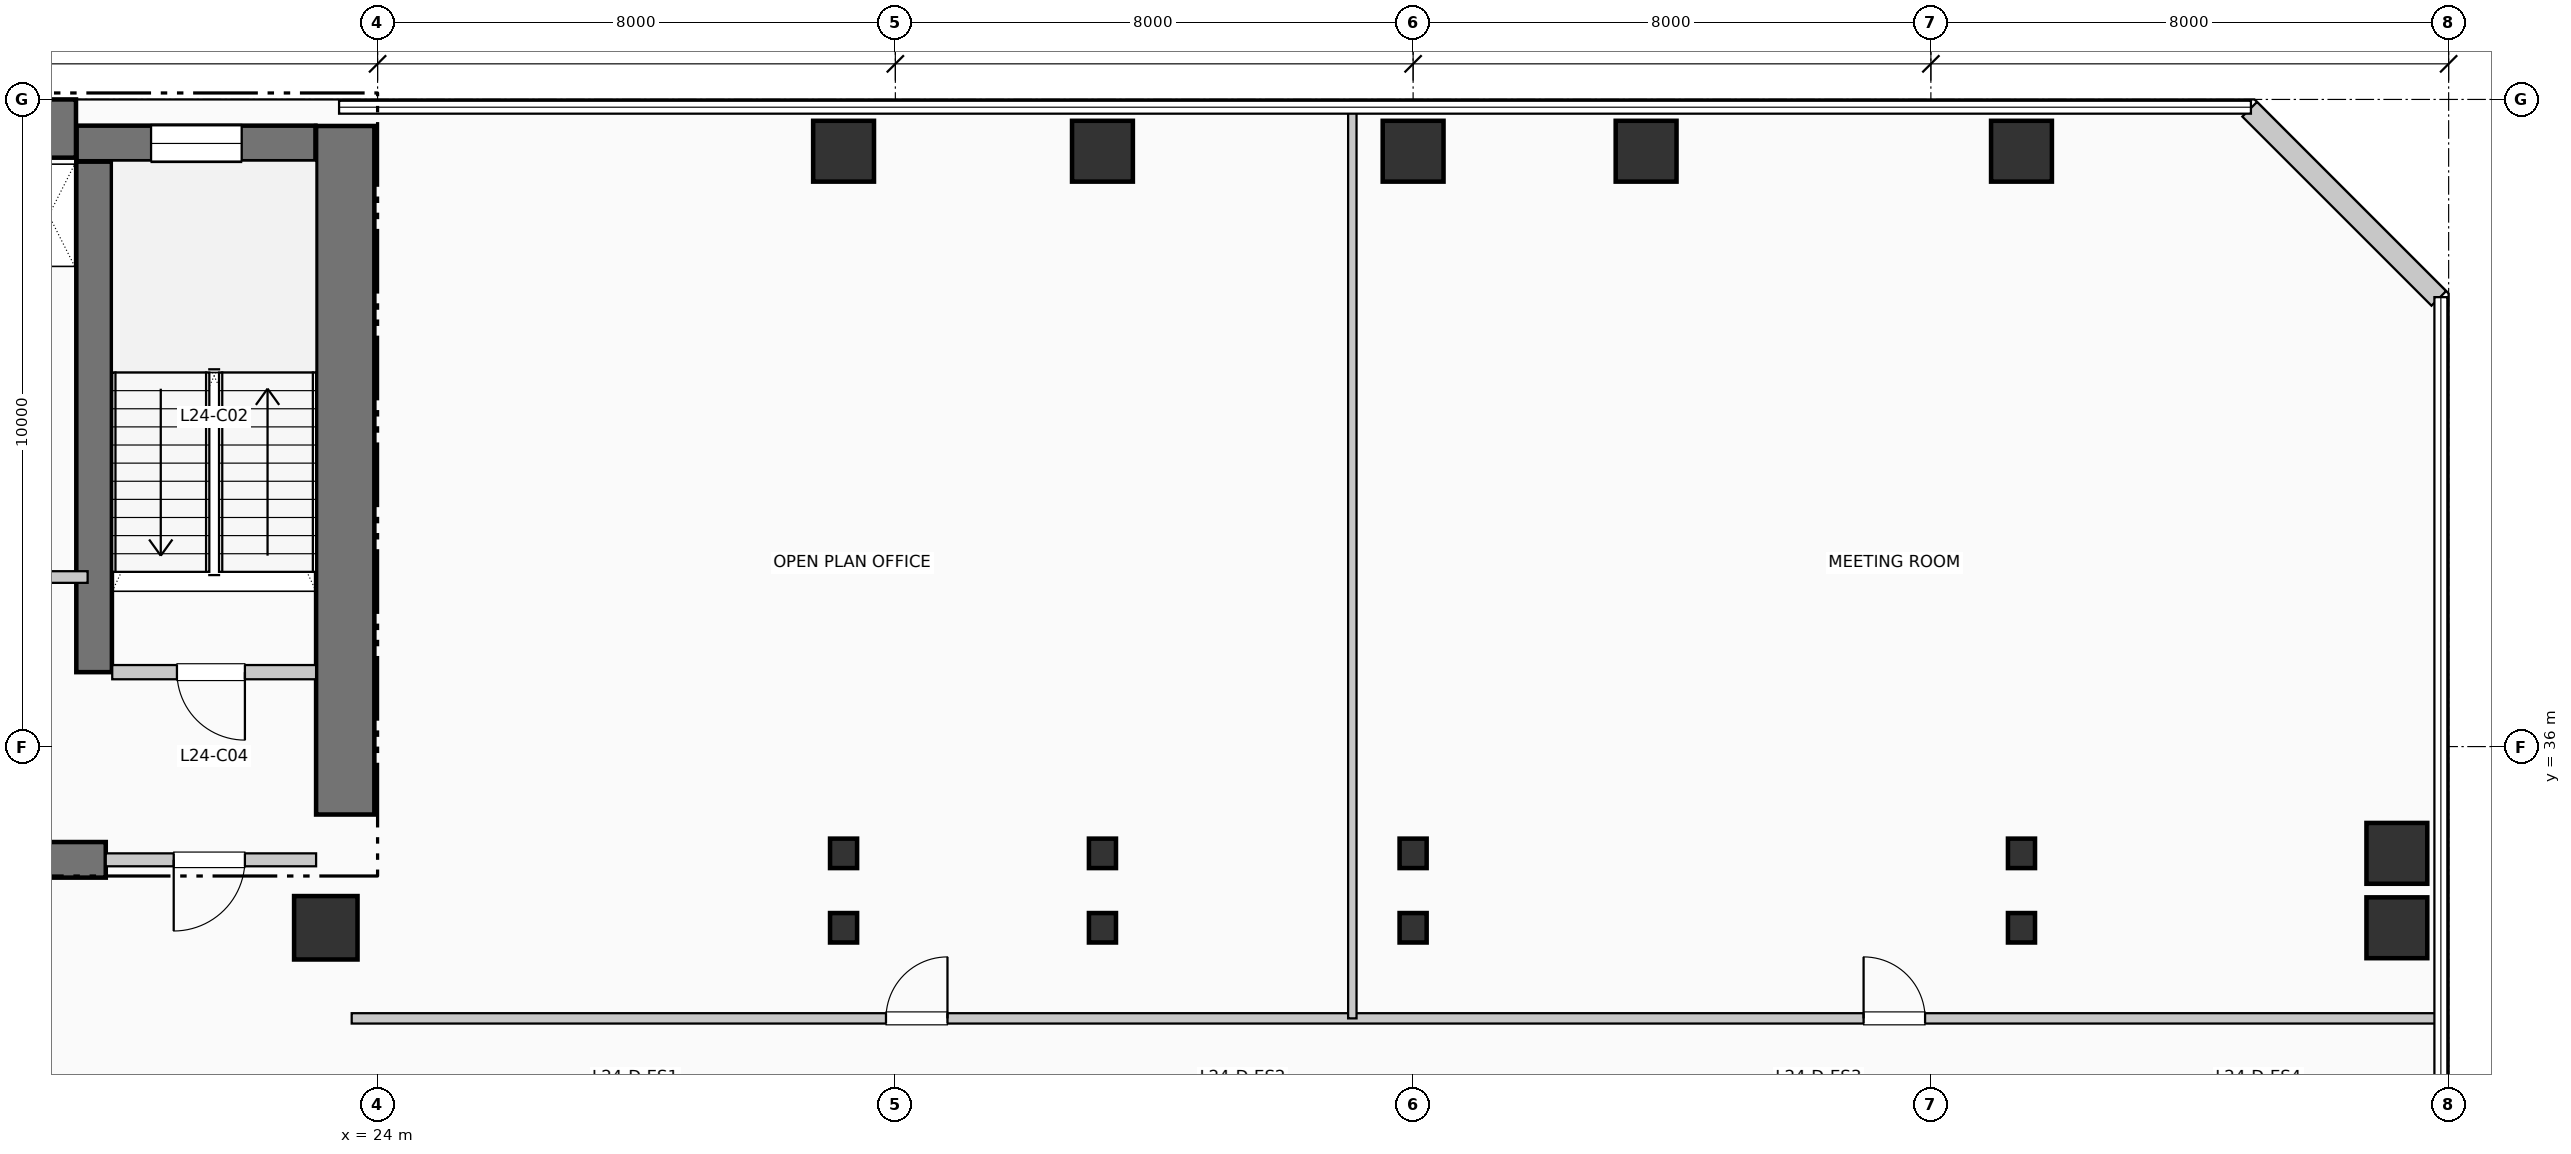
"""IFC4 building model, lengths in metres.
Left out: names, types, materials, properties, quantities, classifications, styles, units other than length and angle.
Written with IfcOpenShell. Run it as: python <this file> out.ifc"""

import sys

from ifc_helpers import new_model, si_unit, direction, frame, frame_2d, origin, origin_2d, place, context, subcontext, project, spatial, rectangle, i_section, extrude, element, fill, save


model = new_model("IFC4")
c1 = context("Model", 3, precision=1e-05, world=origin(), true_north=direction((0.0, 1.0)))
c2 = subcontext(c1, "Body", "Model", "MODEL_VIEW")
j1 = project(units=[si_unit("LENGTHUNIT", "METRE"), si_unit("PLANEANGLEUNIT", "RADIAN")], contexts=[c1])
p1 = place(None, origin())
s1 = spatial("IfcSite", under=j1, at=p1, CompositionType="ELEMENT")
p2 = place(p1, origin())
s2 = spatial("IfcBuilding", under=s1, at=p2, CompositionType="ELEMENT")
p3 = place(p2, frame((0.0, 0.0, 102.63)))
s3 = spatial("IfcBuildingStorey", under=s2, at=p3, CompositionType="ELEMENT", Elevation=102.63)
p4 = place(p3, frame((5.36, 45.55, 0.0), z_axis=(0.0, 0.0, 1.0), x_axis=(1.0, 0.0, 0.0)))
e1 = element("IfcWall", 1, at=p4, inside=s3, PredefinedType="SHEAR", context=c2, shape_type="SweptSolid", body=[
    extrude(rectangle(XDim=13.98, YDim=0.9, at=frame_2d((6.99, 0.0))), origin(), (0.0, 0.0, 1.0), 3.96),
])
p5 = place(p3, frame((23.5, 34.95, 0.0), z_axis=(0.0, 0.0, 1.0), x_axis=(0.0, 1.0, 0.0)))
e2 = element("IfcWall", 2, at=p5, inside=s3, PredefinedType="SHEAR", context=c2, shape_type="SweptSolid", body=[
    extrude(rectangle(XDim=10.64, YDim=0.9, at=frame_2d((5.32, 0.0))), origin(), (0.0, 0.0, 1.0), 3.96),
])
p6 = place(p3, frame((13.68, 34.25, 0.0), z_axis=(0.0, 0.0, 1.0), x_axis=(1.0, 0.0, 0.0)))
e3 = element("IfcWall", 3, at=p6, inside=s3, PredefinedType="SHEAR", context=c2, shape_type="SweptSolid", body=[
    extrude(rectangle(XDim=6.12, YDim=0.55, at=frame_2d((3.06, 0.0))), origin(), (0.0, 0.0, 1.0), 3.96),
])
p7 = place(p3, frame((19.62, 37.15, 0.0), z_axis=(0.0, 0.0, 1.0), x_axis=(0.0, 1.0, 0.0)))
e4 = element("IfcWall", 4, at=p7, inside=s3, PredefinedType="SHEAR", context=c2, shape_type="SweptSolid", body=[
    extrude(rectangle(XDim=7.89, YDim=0.55, at=frame_2d((3.945, 0.0))), origin(), (0.0, 0.0, 1.0), 3.96),
])
p8 = place(p3, frame((19.35, 45.32, 0.0), z_axis=(0.0, 0.0, 1.0), x_axis=(1.0, 0.0, 0.0)))
e5 = element("IfcWall", 5, at=p8, inside=s3, PredefinedType="SHEAR", context=c2, shape_type="SweptSolid", body=[
    extrude(rectangle(XDim=3.69, YDim=0.55, at=frame_2d((1.845, 0.0))), origin(), (0.0, 0.0, 1.0), 3.96),
])
p9 = place(p8, frame((1.15, 0.0, 1.05)))
e6 = element("IfcOpeningElement", 6, at=p9, cuts=e5, PredefinedType="OPENING", context=c2, shape_type="SweptSolid", body=[
    extrude(rectangle(XDim=1.4, YDim=1.8, at=frame_2d((0.7, 0.9))), frame((0.0, 0.285, 0.0), z_axis=(0.0, -1.0, 0.0), x_axis=(1.0, 0.0, 0.0)), (0.0, 0.0, 1.0), 0.57),
])
p10 = place(p3, frame((23.2, 33.2, 0.0), z_axis=(0.0, 0.0, 1.0), x_axis=(1.0, 0.0, 0.0)))
e7 = element("IfcColumn", 7, at=p10, inside=s3, PredefinedType="COLUMN", context=c2, shape_type="SweptSolid", body=[
    extrude(rectangle(XDim=0.98, YDim=0.98, at=origin_2d()), origin(), (0.0, 0.0, 1.0), 3.96),
])
for number, where, z_axis, x_axis in (
    (8, (31.2, 33.2, 0.0), (0.0, 0.0, 1.0), (1.0, 0.0, 0.0)),
    (9, (31.2, 34.35, 0.0), (0.0, 0.0, 1.0), (1.0, 0.0, 0.0)),
):
    element("IfcColumn", number, at=place(p3, frame(where, z_axis=z_axis, x_axis=x_axis)), inside=s3, PredefinedType="COLUMN", context=c2, shape_type="SweptSolid", body=[
        extrude(i_section(OverallWidth=0.418, OverallDepth=0.455, WebThickness=0.032, FlangeThickness=0.051, at=origin_2d()), origin(), (0.0, 0.0, 1.0), 3.96),
    ])
p11 = place(p3, frame((31.2, 45.2, 0.0), z_axis=(0.0, 0.0, 1.0), x_axis=(1.0, 0.0, 0.0)))
e10 = element("IfcColumn", 10, at=p11, inside=s3, PredefinedType="COLUMN", context=c2, shape_type="SweptSolid", body=[
    extrude(rectangle(XDim=0.94, YDim=0.94, at=origin_2d()), origin(), (0.0, 0.0, 1.0), 3.96),
])
for number, where, z_axis, x_axis in (
    (11, (35.2, 33.2, 0.0), (0.0, 0.0, 1.0), (1.0, 0.0, 0.0)),
    (12, (35.2, 34.35, 0.0), (0.0, 0.0, 1.0), (1.0, 0.0, 0.0)),
):
    element("IfcColumn", number, at=place(p3, frame(where, z_axis=z_axis, x_axis=x_axis)), inside=s3, PredefinedType="COLUMN", context=c2, shape_type="SweptSolid", body=[
        extrude(i_section(OverallWidth=0.418, OverallDepth=0.455, WebThickness=0.032, FlangeThickness=0.051, at=origin_2d()), origin(), (0.0, 0.0, 1.0), 3.96),
    ])
p12 = place(p3, frame((35.2, 45.2, 0.0), z_axis=(0.0, 0.0, 1.0), x_axis=(1.0, 0.0, 0.0)))
e13 = element("IfcColumn", 13, at=p12, inside=s3, PredefinedType="COLUMN", context=c2, shape_type="SweptSolid", body=[
    extrude(rectangle(XDim=0.94, YDim=0.94, at=origin_2d()), origin(), (0.0, 0.0, 1.0), 3.96),
])
for number, where, z_axis, x_axis in (
    (14, (40.0, 33.2, 0.0), (0.0, 0.0, 1.0), (1.0, 0.0, 0.0)),
    (15, (40.0, 34.35, 0.0), (0.0, 0.0, 1.0), (1.0, 0.0, 0.0)),
):
    element("IfcColumn", number, at=place(p3, frame(where, z_axis=z_axis, x_axis=x_axis)), inside=s3, PredefinedType="COLUMN", context=c2, shape_type="SweptSolid", body=[
        extrude(i_section(OverallWidth=0.418, OverallDepth=0.455, WebThickness=0.032, FlangeThickness=0.051, at=origin_2d()), origin(), (0.0, 0.0, 1.0), 3.96),
    ])
for number, where, z_axis, x_axis in (
    (16, (40.0, 45.2, 0.0), (0.0, 0.0, 1.0), (1.0, 0.0, 0.0)),
    (17, (43.6, 45.2, 0.0), (0.0, 0.0, 1.0), (1.0, 0.0, 0.0)),
):
    element("IfcColumn", number, at=place(p3, frame(where, z_axis=z_axis, x_axis=x_axis)), inside=s3, PredefinedType="COLUMN", context=c2, shape_type="SweptSolid", body=[
        extrude(rectangle(XDim=0.94, YDim=0.94, at=origin_2d()), origin(), (0.0, 0.0, 1.0), 3.96),
    ])
for number, where, z_axis, x_axis in (
    (18, (49.4, 33.2, 0.0), (0.0, 0.0, 1.0), (1.0, 0.0, 0.0)),
    (19, (49.4, 34.35, 0.0), (0.0, 0.0, 1.0), (1.0, 0.0, 0.0)),
):
    element("IfcColumn", number, at=place(p3, frame(where, z_axis=z_axis, x_axis=x_axis)), inside=s3, PredefinedType="COLUMN", context=c2, shape_type="SweptSolid", body=[
        extrude(i_section(OverallWidth=0.418, OverallDepth=0.455, WebThickness=0.032, FlangeThickness=0.051, at=origin_2d()), origin(), (0.0, 0.0, 1.0), 3.96),
    ])
for number, where, z_axis, x_axis in (
    (20, (49.4, 45.2, 0.0), (0.0, 0.0, 1.0), (1.0, 0.0, 0.0)),
    (21, (55.2, 33.2, 0.0), (0.0, 0.0, 1.0), (1.0, 0.0, 0.0)),
    (22, (55.2, 34.35, 0.0), (0.0, 0.0, 1.0), (1.0, 0.0, 0.0)),
):
    element("IfcColumn", number, at=place(p3, frame(where, z_axis=z_axis, x_axis=x_axis)), inside=s3, PredefinedType="COLUMN", context=c2, shape_type="SweptSolid", body=[
        extrude(rectangle(XDim=0.94, YDim=0.94, at=origin_2d()), origin(), (0.0, 0.0, 1.0), 3.96),
    ])
p13 = place(p3, frame((55.848, 42.926, 0.0), z_axis=(0.0, 0.0, 1.0), x_axis=(-0.707106781187, 0.707106781187, 0.0)))
e23 = element("IfcWall", 23, at=p13, inside=s3, PredefinedType="SOLIDWALL", context=c2, shape_type="SweptSolid", body=[
    extrude(rectangle(XDim=4.133, YDim=0.32, at=frame_2d((2.066, 0.0))), origin(), (0.0, 0.0, 1.0), 3.71),
])
p14 = place(p3, frame((19.9, 37.15, 0.0), z_axis=(0.0, 0.0, 1.0), x_axis=(1.0, 0.0, 0.0)))
e24 = element("IfcWall", 24, at=p14, inside=s3, PredefinedType="PARTITIONING", context=c2, shape_type="SweptSolid", body=[
    extrude(rectangle(XDim=3.15, YDim=0.22, at=frame_2d((1.575, 0.0))), origin(), (0.0, 0.0, 1.0), 3.71),
])
p15 = place(p14, frame((2.05, 0.0, 0.0), z_axis=(0.0, 0.0, 1.0), x_axis=(-1.0, 0.0, 0.0)))
e25 = element("IfcOpeningElement", 25, at=p15, cuts=e24, PredefinedType="OPENING", context=c2, shape_type="SweptSolid", body=[
    extrude(rectangle(XDim=1.05, YDim=2.15, at=frame_2d((0.525, 1.075))), frame((0.0, 0.12, 0.0), z_axis=(0.0, -1.0, 0.0), x_axis=(1.0, 0.0, 0.0)), (0.0, 0.0, 1.0), 0.24),
])
p16 = place(p3, frame((19.8, 34.25, 0.0), z_axis=(0.0, 0.0, 1.0), x_axis=(1.0, 0.0, 0.0)))
e26 = element("IfcWall", 26, at=p16, inside=s3, PredefinedType="PARTITIONING", context=c2, shape_type="SweptSolid", body=[
    extrude(rectangle(XDim=3.25, YDim=0.2, at=frame_2d((1.625, 0.0))), origin(), (0.0, 0.0, 1.0), 3.71),
])
p17 = place(p16, frame((2.15, 0.0, 0.0), z_axis=(0.0, 0.0, 1.0), x_axis=(-1.0, 0.0, 0.0)))
e27 = element("IfcOpeningElement", 27, at=p17, cuts=e26, PredefinedType="OPENING", context=c2, shape_type="SweptSolid", body=[
    extrude(rectangle(XDim=1.1, YDim=2.15, at=frame_2d((0.55, 1.075))), frame((0.0, 0.11, 0.0), z_axis=(0.0, -1.0, 0.0), x_axis=(1.0, 0.0, 0.0)), (0.0, 0.0, 1.0), 0.22),
])
p18 = place(p3, frame((17.68, 38.62, 0.0), z_axis=(0.0, 0.0, 1.0), x_axis=(1.0, 0.0, 0.0)))
e28 = element("IfcWall", 28, at=p18, inside=s3, PredefinedType="PARTITIONING", context=c2, shape_type="SweptSolid", body=[
    extrude(rectangle(XDim=1.84, YDim=0.18, at=frame_2d((0.92, 0.0))), origin(), (0.0, 0.0, 1.0), 3.71),
])
p19 = place(p18, frame((0.24, 0.0, 0.0)))
e29 = element("IfcOpeningElement", 29, at=p19, cuts=e28, PredefinedType="OPENING", context=c2, shape_type="SweptSolid", body=[
    extrude(rectangle(XDim=0.92, YDim=2.1, at=frame_2d((0.46, 1.05))), frame((0.0, 0.1, 0.0), z_axis=(0.0, -1.0, 0.0), x_axis=(1.0, 0.0, 0.0)), (0.0, 0.0, 1.0), 0.2),
])
p20 = place(p3, frame((23.6, 31.8, 0.0), z_axis=(0.0, 0.0, 1.0), x_axis=(1.0, 0.0, 0.0)))
e30 = element("IfcWall", 30, at=p20, inside=s3, PredefinedType="PARTITIONING", context=c2, shape_type="SweptSolid", body=[
    extrude(rectangle(XDim=32.21, YDim=0.16, at=frame_2d((16.105, 0.0))), origin(), (0.0, 0.0, 1.0), 3.71),
])
p21 = place(p20, frame((8.255, 0.0, 0.0)))
e31 = element("IfcOpeningElement", 31, at=p21, cuts=e30, PredefinedType="OPENING", context=c2, shape_type="SweptSolid", body=[
    extrude(rectangle(XDim=0.95, YDim=2.15, at=frame_2d((0.475, 1.075))), frame((0.0, 0.09, 0.0), z_axis=(0.0, -1.0, 0.0), x_axis=(1.0, 0.0, 0.0)), (0.0, 0.0, 1.0), 0.18),
])
p22 = place(p20, frame((23.36, 0.0, 0.0)))
e32 = element("IfcOpeningElement", 32, at=p22, cuts=e30, PredefinedType="OPENING", context=c2, shape_type="SweptSolid", body=[
    extrude(rectangle(XDim=0.95, YDim=2.15, at=frame_2d((0.475, 1.075))), frame((0.0, 0.09, 0.0), z_axis=(0.0, -1.0, 0.0), x_axis=(1.0, 0.0, 0.0)), (0.0, 0.0, 1.0), 0.18),
])
p23 = place(p3, frame((39.061, 31.8, 0.0), z_axis=(0.0, 0.0, 1.0), x_axis=(0.0, 1.0, 0.0)))
e33 = element("IfcWall", 33, at=p23, inside=s3, PredefinedType="PARTITIONING", context=c2, shape_type="SweptSolid", body=[
    extrude(rectangle(XDim=14.01, YDim=0.13, at=frame_2d((7.005, 0.0))), origin(), (0.0, 0.0, 1.0), 3.71),
])
p24 = place(p9, origin())
e34 = element("IfcWindow", 34, at=p24, inside=s3, PartitioningType="SINGLE_PANEL", PredefinedType="WINDOW", context=c2, shape_type="SweptSolid", body=[
    extrude(rectangle(XDim=1.4, YDim=1.8, at=frame_2d((0.7, 0.9))), frame((0.0, 0.03, 0.0), z_axis=(0.0, -1.0, 0.0), x_axis=(1.0, 0.0, 0.0)), (0.0, 0.0, 1.0), 0.06),
])
fill(e6, e34)
p25 = place(p15, origin())
e35 = element("IfcDoor", 35, at=p25, inside=s3, OperationType="SINGLE_SWING_RIGHT", PredefinedType="DOOR", context=c2, shape_type="SweptSolid", body=[
    extrude(rectangle(XDim=1.05, YDim=2.15, at=frame_2d((0.525, 1.075))), frame((0.0, 0.025, 0.0), z_axis=(0.0, -1.0, 0.0), x_axis=(1.0, 0.0, 0.0)), (0.0, 0.0, 1.0), 0.05),
])
fill(e25, e35)
p26 = place(p17, origin())
e36 = element("IfcDoor", 36, at=p26, inside=s3, OperationType="SINGLE_SWING_LEFT", PredefinedType="DOOR", context=c2, shape_type="SweptSolid", body=[
    extrude(rectangle(XDim=1.1, YDim=2.15, at=frame_2d((0.55, 1.075))), frame((0.0, 0.025, 0.0), z_axis=(0.0, -1.0, 0.0), x_axis=(1.0, 0.0, 0.0)), (0.0, 0.0, 1.0), 0.05),
])
fill(e27, e36)
p27 = place(p21, origin())
e37 = element("IfcDoor", 37, at=p27, inside=s3, OperationType="SINGLE_SWING_RIGHT", PredefinedType="DOOR", context=c2, shape_type="SweptSolid", body=[
    extrude(rectangle(XDim=0.95, YDim=2.15, at=frame_2d((0.475, 1.075))), frame((0.0, 0.025, 0.0), z_axis=(0.0, -1.0, 0.0), x_axis=(1.0, 0.0, 0.0)), (0.0, 0.0, 1.0), 0.05),
])
fill(e31, e37)
p28 = place(p22, origin())
e38 = element("IfcDoor", 38, at=p28, inside=s3, OperationType="SINGLE_SWING_LEFT", PredefinedType="DOOR", context=c2, shape_type="SweptSolid", body=[
    extrude(rectangle(XDim=0.95, YDim=2.15, at=frame_2d((0.475, 1.075))), frame((0.0, 0.025, 0.0), z_axis=(0.0, -1.0, 0.0), x_axis=(1.0, 0.0, 0.0)), (0.0, 0.0, 1.0), 0.05),
])
fill(e32, e38)
save(model, sys.argv[1])
